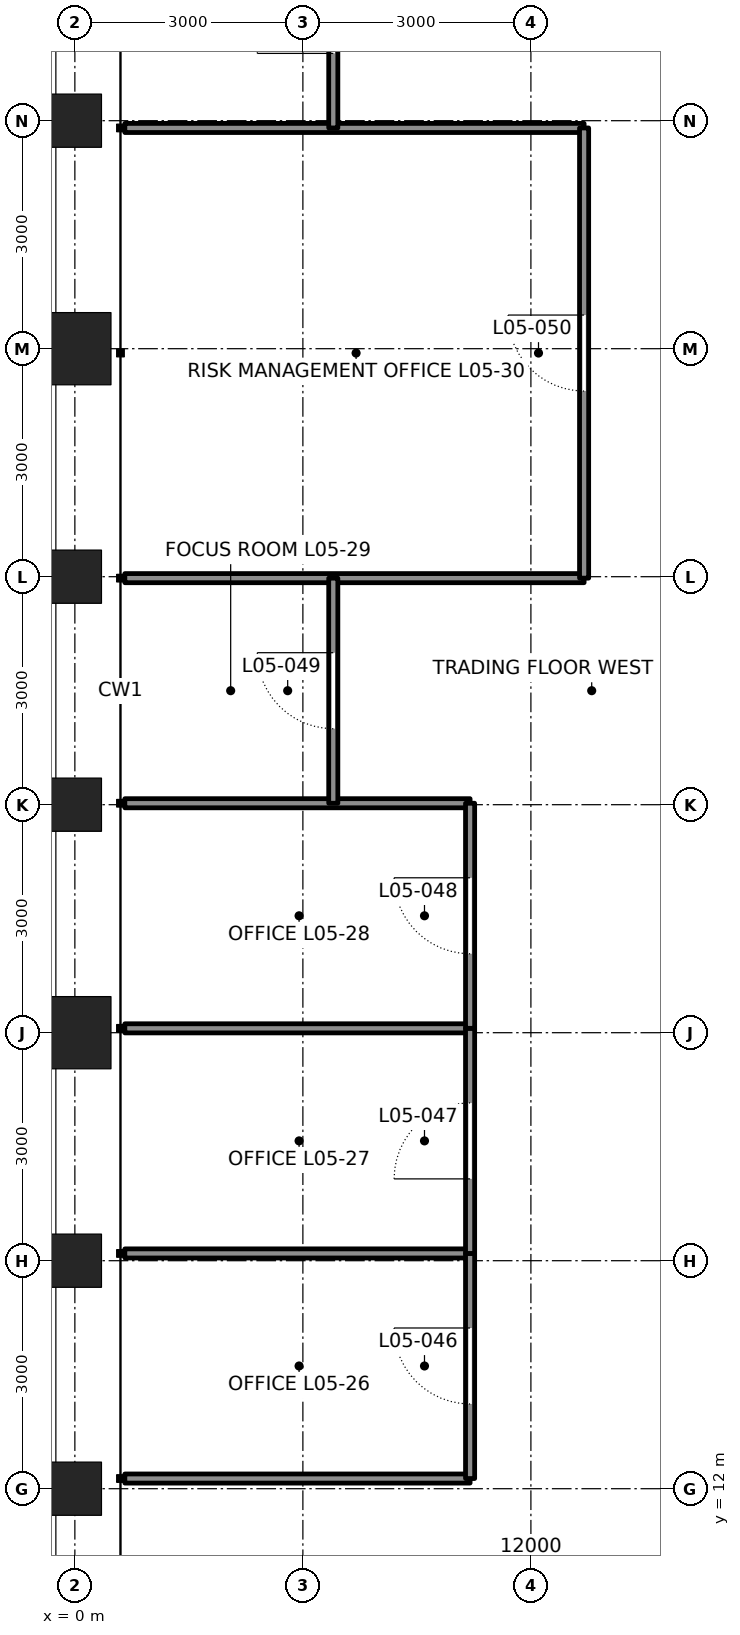
"""IFC4 building model, lengths in metres.
Left out: names, types, materials, properties, quantities, classifications, styles, units other than length and angle.
Written with IfcOpenShell. Run it as: python <this file> out.ifc"""

import sys

from ifc_helpers import new_model, si_unit, direction, frame, frame_2d, origin, origin_2d, place, context, subcontext, project, spatial, rectangle, hollow_rectangle, extrude, element, fill, save


model = new_model("IFC4")
c1 = context("Model", 3, precision=1e-05, world=origin(), true_north=direction((0.0, 1.0)))
c2 = subcontext(c1, "Body", "Model", "MODEL_VIEW")
j1 = project(units=[si_unit("LENGTHUNIT", "METRE"), si_unit("PLANEANGLEUNIT", "RADIAN")], contexts=[c1])
p1 = place(None, origin())
s1 = spatial("IfcSite", under=j1, at=p1, CompositionType="ELEMENT")
p2 = place(p1, origin())
s2 = spatial("IfcBuilding", under=s1, at=p2, CompositionType="ELEMENT")
p3 = place(p2, frame((0.0, 0.0, 28.8)))
s3 = spatial("IfcBuildingStorey", under=s2, at=p3, CompositionType="ELEMENT", Elevation=28.8)
p4 = place(p3, frame((0.0, 30.0, 0.0), z_axis=(0.0, 0.0, 1.0), x_axis=(-1.0, 0.0, 0.0)))
e1 = element("IfcColumn", 1, at=p4, inside=s3, PredefinedType="COLUMN", context=c2, shape_type="SweptSolid", body=[
    extrude(hollow_rectangle(XDim=0.7, YDim=0.7, WallThickness=0.07, at=origin_2d()), origin(), (0.0, 0.0, 1.0), 4.5),
])
p5 = place(p3, frame((0.0, 27.0, 0.0), z_axis=(0.0, 0.0, 1.0), x_axis=(-1.0, 0.0, 0.0)))
e2 = element("IfcColumn", 2, at=p5, inside=s3, PredefinedType="COLUMN", context=c2, shape_type="SweptSolid", body=[
    extrude(hollow_rectangle(XDim=0.95, YDim=0.95, WallThickness=0.11, at=origin_2d()), origin(), (0.0, 0.0, 1.0), 4.5),
])
for number, where, z_axis, x_axis in (
    (3, (0.0, 24.0, 0.0), (0.0, 0.0, 1.0), (-1.0, 0.0, 0.0)),
    (4, (0.0, 21.0, 0.0), (0.0, 0.0, 1.0), (-1.0, 0.0, 0.0)),
):
    element("IfcColumn", number, at=place(p3, frame(where, z_axis=z_axis, x_axis=x_axis)), inside=s3, PredefinedType="COLUMN", context=c2, shape_type="SweptSolid", body=[
        extrude(hollow_rectangle(XDim=0.7, YDim=0.7, WallThickness=0.07, at=origin_2d()), origin(), (0.0, 0.0, 1.0), 4.5),
    ])
p6 = place(p3, frame((0.0, 18.0, 0.0), z_axis=(0.0, 0.0, 1.0), x_axis=(-1.0, 0.0, 0.0)))
e5 = element("IfcColumn", 5, at=p6, inside=s3, PredefinedType="COLUMN", context=c2, shape_type="SweptSolid", body=[
    extrude(hollow_rectangle(XDim=0.95, YDim=0.95, WallThickness=0.11, at=origin_2d()), origin(), (0.0, 0.0, 1.0), 4.5),
])
for number, where, z_axis, x_axis in (
    (6, (0.0, 15.0, 0.0), (0.0, 0.0, 1.0), (-1.0, 0.0, 0.0)),
    (7, (0.0, 12.0, 0.0), (0.0, 0.0, 1.0), (-1.0, 0.0, 0.0)),
):
    element("IfcColumn", number, at=place(p3, frame(where, z_axis=z_axis, x_axis=x_axis)), inside=s3, PredefinedType="COLUMN", context=c2, shape_type="SweptSolid", body=[
        extrude(hollow_rectangle(XDim=0.7, YDim=0.7, WallThickness=0.07, at=origin_2d()), origin(), (0.0, 0.0, 1.0), 4.5),
    ])
p7 = place(p3, frame((0.657, 12.134, -0.3), z_axis=(0.0, 0.0, 1.0), x_axis=(1.0, 0.0, 0.0)))
e8 = element("IfcWall", 8, at=p7, inside=s3, PredefinedType="PARTITIONING", context=c2, shape_type="SweptSolid", body=[
    extrude(rectangle(XDim=4.542, YDim=0.12, at=frame_2d((2.271, 0.0))), origin(), (0.0, 0.0, 1.0), 3.481),
])
for number, where, z_axis, x_axis in (
    (9, (0.657, 15.096, -0.3), (0.0, 0.0, 1.0), (1.0, 0.0, 0.0)),
    (10, (0.657, 18.057, -0.3), (0.0, 0.0, 1.0), (1.0, 0.0, 0.0)),
    (11, (0.657, 21.019, -0.3), (0.0, 0.0, 1.0), (1.0, 0.0, 0.0)),
):
    element("IfcWall", number, at=place(p3, frame(where, z_axis=z_axis, x_axis=x_axis)), inside=s3, PredefinedType="PARTITIONING", context=c2, shape_type="SweptSolid", body=[
        extrude(rectangle(XDim=4.542, YDim=0.12, at=frame_2d((2.271, 0.0))), origin(), (0.0, 0.0, 1.0), 3.646),
    ])
for number, where, z_axis, x_axis in (
    (12, (0.657, 23.981, -0.3), (0.0, 0.0, 1.0), (1.0, 0.0, 0.0)),
    (13, (0.657, 29.904, -0.3), (0.0, 0.0, 1.0), (1.0, 0.0, 0.0)),
):
    element("IfcWall", number, at=place(p3, frame(where, z_axis=z_axis, x_axis=x_axis)), inside=s3, PredefinedType="PARTITIONING", context=c2, shape_type="SweptSolid", body=[
        extrude(rectangle(XDim=6.042, YDim=0.12, at=frame_2d((3.021, 0.0))), origin(), (0.0, 0.0, 1.0), 3.646),
    ])
p8 = place(p3, frame((5.2, 12.134, -0.3), z_axis=(0.0, 0.0, 1.0), x_axis=(0.0, 1.0, 0.0)))
e14 = element("IfcWall", 14, at=p8, inside=s3, PredefinedType="PARTITIONING", context=c2, shape_type="SweptSolid", body=[
    extrude(rectangle(XDim=2.962, YDim=0.12, at=frame_2d((1.481, 0.0))), origin(), (0.0, 0.0, 1.0), 4.34),
])
p9 = place(p8, frame((0.981, 0.0, 0.3)))
e15 = element("IfcOpeningElement", 15, at=p9, cuts=e14, PredefinedType="OPENING", context=c2, shape_type="SweptSolid", body=[
    extrude(rectangle(XDim=1.0, YDim=2.4, at=frame_2d((0.5, 1.2))), frame((0.0, 0.07, 0.0), z_axis=(0.0, -1.0, 0.0), x_axis=(1.0, 0.0, 0.0)), (0.0, 0.0, 1.0), 0.14),
])
p10 = place(p3, frame((5.2, 15.096, -0.3), z_axis=(0.0, 0.0, 1.0), x_axis=(0.0, 1.0, 0.0)))
e16 = element("IfcWall", 16, at=p10, inside=s3, PredefinedType="PARTITIONING", context=c2, shape_type="SweptSolid", body=[
    extrude(rectangle(XDim=2.962, YDim=0.12, at=frame_2d((1.481, 0.0))), origin(), (0.0, 0.0, 1.0), 4.34),
])
p11 = place(p10, frame((0.981, 0.0, 0.3)))
e17 = element("IfcOpeningElement", 17, at=p11, cuts=e16, PredefinedType="OPENING", context=c2, shape_type="SweptSolid", body=[
    extrude(rectangle(XDim=1.0, YDim=2.4, at=frame_2d((0.5, 1.2))), frame((0.0, 0.07, 0.0), z_axis=(0.0, -1.0, 0.0), x_axis=(1.0, 0.0, 0.0)), (0.0, 0.0, 1.0), 0.14),
])
p12 = place(p3, frame((5.2, 18.057, -0.3), z_axis=(0.0, 0.0, 1.0), x_axis=(0.0, 1.0, 0.0)))
e18 = element("IfcWall", 18, at=p12, inside=s3, PredefinedType="PARTITIONING", context=c2, shape_type="SweptSolid", body=[
    extrude(rectangle(XDim=2.962, YDim=0.12, at=frame_2d((1.481, 0.0))), origin(), (0.0, 0.0, 1.0), 4.34),
])
p13 = place(p12, frame((0.981, 0.0, 0.3)))
e19 = element("IfcOpeningElement", 19, at=p13, cuts=e18, PredefinedType="OPENING", context=c2, shape_type="SweptSolid", body=[
    extrude(rectangle(XDim=1.0, YDim=2.4, at=frame_2d((0.5, 1.2))), frame((0.0, 0.07, 0.0), z_axis=(0.0, -1.0, 0.0), x_axis=(1.0, 0.0, 0.0)), (0.0, 0.0, 1.0), 0.14),
])
p14 = place(p3, frame((3.4, 21.019, -0.3), z_axis=(0.0, 0.0, 1.0), x_axis=(0.0, 1.0, 0.0)))
e20 = element("IfcWall", 20, at=p14, inside=s3, PredefinedType="PARTITIONING", context=c2, shape_type="SweptSolid", body=[
    extrude(rectangle(XDim=2.962, YDim=0.12, at=frame_2d((1.481, 0.0))), origin(), (0.0, 0.0, 1.0), 4.34),
])
p15 = place(p14, frame((0.981, 0.0, 0.3)))
e21 = element("IfcOpeningElement", 21, at=p15, cuts=e20, PredefinedType="OPENING", context=c2, shape_type="SweptSolid", body=[
    extrude(rectangle(XDim=1.0, YDim=2.4, at=frame_2d((0.5, 1.2))), frame((0.0, 0.07, 0.0), z_axis=(0.0, -1.0, 0.0), x_axis=(1.0, 0.0, 0.0)), (0.0, 0.0, 1.0), 0.14),
])
p16 = place(p3, frame((6.7, 23.981, -0.3), z_axis=(0.0, 0.0, 1.0), x_axis=(0.0, 1.0, 0.0)))
e22 = element("IfcWall", 22, at=p16, inside=s3, PredefinedType="PARTITIONING", context=c2, shape_type="SweptSolid", body=[
    extrude(rectangle(XDim=5.923, YDim=0.12, at=frame_2d((2.962, 0.0))), origin(), (0.0, 0.0, 1.0), 4.34),
])
p17 = place(p16, frame((2.462, 0.0, 0.3)))
e23 = element("IfcOpeningElement", 23, at=p17, cuts=e22, PredefinedType="OPENING", context=c2, shape_type="SweptSolid", body=[
    extrude(rectangle(XDim=1.0, YDim=2.4, at=frame_2d((0.5, 1.2))), frame((0.0, 0.07, 0.0), z_axis=(0.0, -1.0, 0.0), x_axis=(1.0, 0.0, 0.0)), (0.0, 0.0, 1.0), 0.14),
])
p18 = place(p3, frame((3.4, 29.904, -0.3), z_axis=(0.0, 0.0, 1.0), x_axis=(0.0, 1.0, 0.0)))
e24 = element("IfcWall", 24, at=p18, inside=s3, PredefinedType="PARTITIONING", context=c2, shape_type="SweptSolid", body=[
    extrude(rectangle(XDim=2.962, YDim=0.12, at=frame_2d((1.481, 0.0))), origin(), (0.0, 0.0, 1.0), 4.34),
])
p19 = place(p18, frame((0.981, 0.0, 0.3)))
e25 = element("IfcOpeningElement", 25, at=p19, cuts=e24, PredefinedType="OPENING", context=c2, shape_type="SweptSolid", body=[
    extrude(rectangle(XDim=1.0, YDim=2.4, at=frame_2d((0.5, 1.2))), frame((0.0, 0.07, 0.0), z_axis=(0.0, -1.0, 0.0), x_axis=(1.0, 0.0, 0.0)), (0.0, 0.0, 1.0), 0.14),
])
p20 = place(p3, frame((10.2, 12.0, -0.3), z_axis=(0.0, 0.0, 1.0), x_axis=(-0.707106781187, -0.707106781187, 0.0)))
e26 = element("IfcWall", 26, at=p20, inside=s3, PredefinedType="PARTITIONING", context=c2, shape_type="SweptSolid", body=[
    extrude(rectangle(XDim=7.497, YDim=0.12, at=frame_2d((3.749, 0.0))), origin(), (0.0, 0.0, 1.0), 4.34),
])
p21 = place(p20, frame((1.3, 0.0, 0.3)))
e27 = element("IfcOpeningElement", 27, at=p21, cuts=e26, PredefinedType="OPENING", context=c2, shape_type="SweptSolid", body=[
    extrude(rectangle(XDim=1.0, YDim=2.4, at=frame_2d((0.5, 1.2))), frame((0.0, 0.07, 0.0), z_axis=(0.0, -1.0, 0.0), x_axis=(1.0, 0.0, 0.0)), (0.0, 0.0, 1.0), 0.14),
])
p22 = place(p9, origin())
e28 = element("IfcDoor", 28, at=p22, inside=s3, OperationType="SINGLE_SWING_RIGHT", PredefinedType="DOOR", context=c2, shape_type="SweptSolid", body=[
    extrude(rectangle(XDim=1.0, YDim=2.4, at=frame_2d((0.5, 1.2))), frame((0.0, 0.025, 0.0), z_axis=(0.0, -1.0, 0.0), x_axis=(1.0, 0.0, 0.0)), (0.0, 0.0, 1.0), 0.05),
])
fill(e15, e28)
p23 = place(p11, origin())
e29 = element("IfcDoor", 29, at=p23, inside=s3, OperationType="SINGLE_SWING_LEFT", PredefinedType="DOOR", context=c2, shape_type="SweptSolid", body=[
    extrude(rectangle(XDim=1.0, YDim=2.4, at=frame_2d((0.5, 1.2))), frame((0.0, 0.025, 0.0), z_axis=(0.0, -1.0, 0.0), x_axis=(1.0, 0.0, 0.0)), (0.0, 0.0, 1.0), 0.05),
])
fill(e17, e29)
p24 = place(p13, origin())
e30 = element("IfcDoor", 30, at=p24, inside=s3, OperationType="SINGLE_SWING_RIGHT", PredefinedType="DOOR", context=c2, shape_type="SweptSolid", body=[
    extrude(rectangle(XDim=1.0, YDim=2.4, at=frame_2d((0.5, 1.2))), frame((0.0, 0.025, 0.0), z_axis=(0.0, -1.0, 0.0), x_axis=(1.0, 0.0, 0.0)), (0.0, 0.0, 1.0), 0.05),
])
fill(e19, e30)
p25 = place(p15, origin())
e31 = element("IfcDoor", 31, at=p25, inside=s3, OperationType="SINGLE_SWING_RIGHT", PredefinedType="DOOR", context=c2, shape_type="SweptSolid", body=[
    extrude(rectangle(XDim=1.0, YDim=2.4, at=frame_2d((0.5, 1.2))), frame((0.0, 0.025, 0.0), z_axis=(0.0, -1.0, 0.0), x_axis=(1.0, 0.0, 0.0)), (0.0, 0.0, 1.0), 0.05),
])
fill(e21, e31)
p26 = place(p17, origin())
e32 = element("IfcDoor", 32, at=p26, inside=s3, OperationType="SINGLE_SWING_RIGHT", PredefinedType="DOOR", context=c2, shape_type="SweptSolid", body=[
    extrude(rectangle(XDim=1.0, YDim=2.4, at=frame_2d((0.5, 1.2))), frame((0.0, 0.025, 0.0), z_axis=(0.0, -1.0, 0.0), x_axis=(1.0, 0.0, 0.0)), (0.0, 0.0, 1.0), 0.05),
])
fill(e23, e32)
p27 = place(p19, origin())
e33 = element("IfcDoor", 33, at=p27, inside=s3, OperationType="SINGLE_SWING_LEFT", PredefinedType="DOOR", context=c2, shape_type="SweptSolid", body=[
    extrude(rectangle(XDim=1.0, YDim=2.4, at=frame_2d((0.5, 1.2))), frame((0.0, 0.025, 0.0), z_axis=(0.0, -1.0, 0.0), x_axis=(1.0, 0.0, 0.0)), (0.0, 0.0, 1.0), 0.05),
])
fill(e25, e33)
save(model, sys.argv[1])
